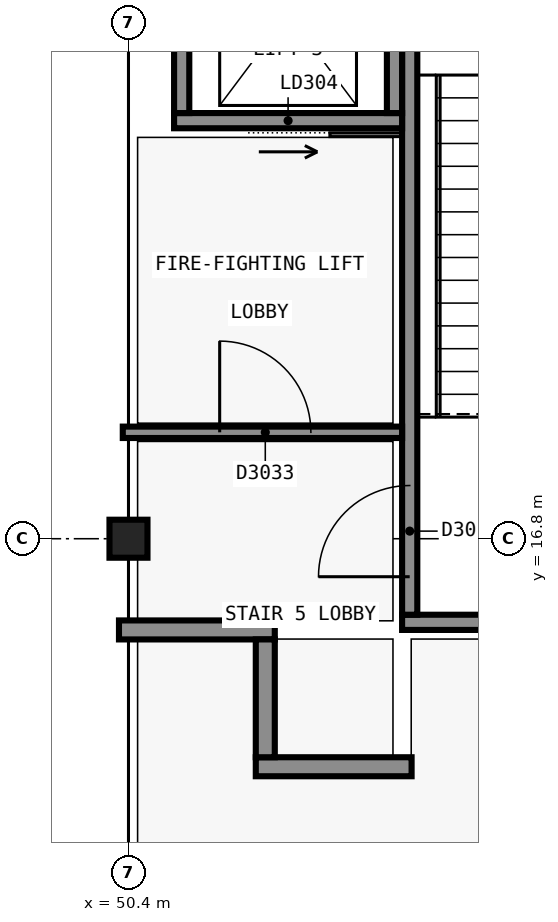
"""IFC4 building model, lengths in metres.
Left out: names, types, materials, properties, quantities, classifications, styles, units other than length and angle.
Written with IfcOpenShell. Run it as: python <this file> out.ifc"""

import sys

from ifc_helpers import new_model, si_unit, direction, frame, frame_2d, origin, origin_2d, place, context, subcontext, project, spatial, rectangle, extrude, element, fill, save


model = new_model("IFC4")
c1 = context("Model", 3, precision=1e-05, world=origin(), true_north=direction((0.0, 1.0)))
c2 = subcontext(c1, "Body", "Model", "MODEL_VIEW")
j1 = project(units=[si_unit("LENGTHUNIT", "METRE"), si_unit("PLANEANGLEUNIT", "RADIAN")], contexts=[c1])
p1 = place(None, origin())
s1 = spatial("IfcSite", under=j1, at=p1, CompositionType="ELEMENT")
p2 = place(p1, origin())
s2 = spatial("IfcBuilding", under=s1, at=p2, CompositionType="ELEMENT")
p3 = place(p2, frame((0.0, 0.0, 15.0)))
s3 = spatial("IfcBuildingStorey", under=s2, at=p3, CompositionType="ELEMENT", Elevation=15.0)
p4 = place(p3, frame((58.8, 15.7, 0.0), z_axis=(0.0, 0.0, 1.0), x_axis=(-1.0, 0.0, 0.0)))
e1 = element("IfcWall", 1, at=p4, inside=s3, PredefinedType="SHEAR", context=c2, shape_type="SweptSolid", body=[
    extrude(rectangle(XDim=4.8, YDim=0.2, at=frame_2d((2.4, 0.0))), origin(), (0.0, 0.0, 1.0), 4.8),
])
p5 = place(p3, frame((54.1, 15.8, 0.0), z_axis=(0.0, 0.0, 1.0), x_axis=(0.0, 1.0, 0.0)))
e2 = element("IfcWall", 2, at=p5, inside=s3, PredefinedType="SHEAR", context=c2, shape_type="SweptSolid", body=[
    extrude(rectangle(XDim=9.2, YDim=0.2, at=frame_2d((4.6, 0.0))), origin(), (0.0, 0.0, 1.0), 4.8),
])
p6 = place(p5, frame((0.5, 0.0, 0.0)))
e3 = element("IfcOpeningElement", 3, at=p6, cuts=e2, PredefinedType="OPENING", context=c2, shape_type="SweptSolid", body=[
    extrude(rectangle(XDim=1.2, YDim=2.1, at=frame_2d((0.6, 1.05))), frame((0.0, 0.11, 0.0), z_axis=(0.0, -1.0, 0.0), x_axis=(1.0, 0.0, 0.0)), (0.0, 0.0, 1.0), 0.22),
])
p7 = place(p3, frame((54.0, 22.3, 0.0), z_axis=(0.0, 0.0, 1.0), x_axis=(-1.0, 0.0, 0.0)))
e4 = element("IfcWall", 4, at=p7, inside=s3, PredefinedType="SHEAR", context=c2, shape_type="SweptSolid", body=[
    extrude(rectangle(XDim=3.0, YDim=0.2, at=frame_2d((1.5, 0.0))), origin(), (0.0, 0.0, 1.0), 4.8),
])
p8 = place(p7, frame((0.95, 0.0, 0.0)))
e5 = element("IfcOpeningElement", 5, at=p8, cuts=e4, PredefinedType="OPENING", context=c2, shape_type="SweptSolid", body=[
    extrude(rectangle(XDim=1.1, YDim=2.1, at=frame_2d((0.55, 1.05))), frame((0.0, 0.11, 0.0), z_axis=(0.0, -1.0, 0.0), x_axis=(1.0, 0.0, 0.0)), (0.0, 0.0, 1.0), 0.22),
])
for number, where, z_axis, x_axis in (
    (6, (51.1, 22.4, 0.0), (0.0, 0.0, 1.0), (0.0, 1.0, 0.0)),
    (7, (53.9, 25.0, 0.0), (0.0, 0.0, 1.0), (0.0, -1.0, 0.0)),
):
    element("IfcWall", number, at=place(p3, frame(where, z_axis=z_axis, x_axis=x_axis)), inside=s3, PredefinedType="SHEAR", context=c2, shape_type="SweptSolid", body=[
        extrude(rectangle(XDim=2.6, YDim=0.2, at=frame_2d((1.3, 0.0))), origin(), (0.0, 0.0, 1.0), 4.8),
    ])
p9 = place(p3, frame((50.4, 16.8, 0.0), z_axis=(0.0, 0.0, 1.0), x_axis=(1.0, 0.0, 0.0)))
e8 = element("IfcColumn", 8, at=p9, inside=s3, PredefinedType="COLUMN", context=c2, shape_type="SweptSolid", body=[
    extrude(rectangle(XDim=0.5, YDim=0.5, at=origin_2d()), origin(), (0.0, 0.0, 1.0), 4.8),
])
p10 = place(p3, frame((52.075, 13.8, 0.0), z_axis=(0.0, 0.0, 1.0), x_axis=(1.0, 0.0, 0.0)))
e9 = element("IfcWall", 9, at=p10, inside=s3, PredefinedType="PARTITIONING", context=c2, shape_type="SweptSolid", body=[
    extrude(rectangle(XDim=2.05, YDim=0.25, at=frame_2d((1.025, 0.0))), origin(), (0.0, 0.0, 1.0), 4.4),
])
p11 = place(p3, frame((50.275, 15.6, 0.0), z_axis=(0.0, 0.0, 1.0), x_axis=(1.0, 0.0, 0.0)))
e10 = element("IfcWall", 10, at=p11, inside=s3, PredefinedType="PARTITIONING", context=c2, shape_type="SweptSolid", body=[
    extrude(rectangle(XDim=2.05, YDim=0.25, at=frame_2d((1.025, 0.0))), origin(), (0.0, 0.0, 1.0), 3.7),
])
p12 = place(p3, frame((52.2, 13.925, 0.0), z_axis=(0.0, 0.0, 1.0), x_axis=(0.0, 1.0, 0.0)))
e11 = element("IfcWall", 11, at=p12, inside=s3, PredefinedType="PARTITIONING", context=c2, shape_type="SweptSolid", body=[
    extrude(rectangle(XDim=1.55, YDim=0.25, at=frame_2d((0.775, 0.0))), origin(), (0.0, 0.0, 1.0), 3.9),
])
p13 = place(p3, frame((50.325, 18.2, 0.0), z_axis=(0.0, 0.0, 1.0), x_axis=(1.0, 0.0, 0.0)))
e12 = element("IfcWall", 12, at=p13, inside=s3, PredefinedType="SOLIDWALL", context=c2, shape_type="SweptSolid", body=[
    extrude(rectangle(XDim=3.675, YDim=0.15, at=frame_2d((1.837, 0.0))), origin(), (0.0, 0.0, 1.0), 3.7),
])
p14 = place(p13, frame((1.275, 0.0, 0.0)))
e13 = element("IfcOpeningElement", 13, at=p14, cuts=e12, PredefinedType="OPENING", context=c2, shape_type="SweptSolid", body=[
    extrude(rectangle(XDim=1.2, YDim=2.1, at=frame_2d((0.6, 1.05))), frame((0.0, 0.085, 0.0), z_axis=(0.0, -1.0, 0.0), x_axis=(1.0, 0.0, 0.0)), (0.0, 0.0, 1.0), 0.17),
])
p15 = place(p8, origin())
e14 = element("IfcDoor", 14, at=p15, inside=s3, OperationType="SLIDING_TO_LEFT", PredefinedType="DOOR", context=c2, shape_type="SweptSolid", body=[
    extrude(rectangle(XDim=1.1, YDim=2.1, at=frame_2d((0.55, 1.05))), frame((0.0, 0.025, 0.0), z_axis=(0.0, -1.0, 0.0), x_axis=(1.0, 0.0, 0.0)), (0.0, 0.0, 1.0), 0.05),
])
fill(e5, e14)
p16 = place(p6, origin())
e15 = element("IfcDoor", 15, at=p16, inside=s3, OperationType="SINGLE_SWING_LEFT", PredefinedType="DOOR", context=c2, shape_type="SweptSolid", body=[
    extrude(rectangle(XDim=1.2, YDim=2.1, at=frame_2d((0.6, 1.05))), frame((0.0, 0.025, 0.0), z_axis=(0.0, -1.0, 0.0), x_axis=(1.0, 0.0, 0.0)), (0.0, 0.0, 1.0), 0.05),
])
fill(e3, e15)
p17 = place(p14, origin())
e16 = element("IfcDoor", 16, at=p17, inside=s3, OperationType="SINGLE_SWING_RIGHT", PredefinedType="DOOR", context=c2, shape_type="SweptSolid", body=[
    extrude(rectangle(XDim=1.2, YDim=2.1, at=frame_2d((0.6, 1.05))), frame((0.0, 0.025, 0.0), z_axis=(0.0, -1.0, 0.0), x_axis=(1.0, 0.0, 0.0)), (0.0, 0.0, 1.0), 0.05),
])
fill(e13, e16)
save(model, sys.argv[1])
